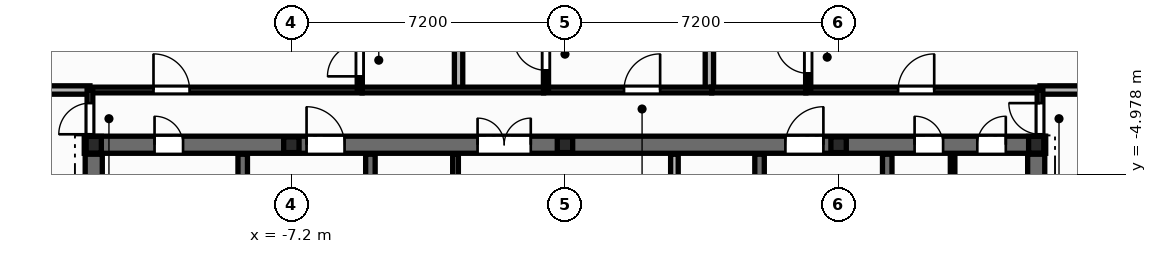
"""IFC4 building model, lengths in metres.
Left out: names, types, materials, properties, quantities, classifications, styles, units other than length and angle.
Written with IfcOpenShell. Run it as: python <this file> out.ifc"""

import sys

from ifc_helpers import new_model, si_unit, direction, frame, frame_2d, origin, origin_2d, place, context, subcontext, project, spatial, rectangle, i_section, extrude, element, fill, save


model = new_model("IFC4")
c1 = context("Model", 3, precision=1e-05, world=origin(), true_north=direction((0.0, 1.0)))
c2 = subcontext(c1, "Body", "Model", "MODEL_VIEW")
j1 = project(units=[si_unit("LENGTHUNIT", "METRE"), si_unit("PLANEANGLEUNIT", "RADIAN")], contexts=[c1])
p1 = place(None, origin())
s1 = spatial("IfcSite", under=j1, at=p1, CompositionType="ELEMENT")
p2 = place(p1, origin())
s2 = spatial("IfcBuilding", under=s1, at=p2, CompositionType="ELEMENT")
p3 = place(p2, frame((0.0, 0.0, 221.7)))
s3 = spatial("IfcBuildingStorey", under=s2, at=p3, CompositionType="ELEMENT", Elevation=221.7)
for number, where, z_axis, x_axis in (
    (1, (12.4, -4.2, 0.0), (0.0, 0.0, 1.0), (1.0, 0.0, 0.0)),
    (2, (-12.4, -4.2, 0.0), (0.0, 0.0, 1.0), (1.0, 0.0, 0.0)),
):
    element("IfcColumn", number, at=place(p3, frame(where, z_axis=z_axis, x_axis=x_axis)), inside=s3, PredefinedType="COLUMN", context=c2, shape_type="SweptSolid", body=[
        extrude(i_section(OverallWidth=0.4, OverallDepth=0.44, WebThickness=0.028, FlangeThickness=0.04, at=origin_2d()), origin(), (0.0, 0.0, 1.0), 3.6),
    ])
for number, where, z_axis, x_axis in (
    (3, (-7.2, -4.2, 0.0), (0.0, 0.0, 1.0), (1.0, 0.0, 0.0)),
    (4, (0.0, -4.2, 0.0), (0.0, 0.0, 1.0), (1.0, 0.0, 0.0)),
    (5, (7.2, -4.2, 0.0), (0.0, 0.0, 1.0), (1.0, 0.0, 0.0)),
):
    element("IfcColumn", number, at=place(p3, frame(where, z_axis=z_axis, x_axis=x_axis)), inside=s3, PredefinedType="PILASTER", context=c2, shape_type="SweptSolid", body=[
        extrude(i_section(OverallWidth=0.405, OverallDepth=0.414, WebThickness=0.022, FlangeThickness=0.032, at=origin_2d()), origin(), (0.0, 0.0, 1.0), 3.6),
    ])
p4 = place(p3, frame((-2.88, -5.6, 0.0), z_axis=(0.0, 0.0, 1.0), x_axis=(0.0, 1.0, 0.0)))
e6 = element("IfcWall", 6, at=p4, inside=s3, PredefinedType="PARTITIONING", context=c2, shape_type="SweptSolid", body=[
    extrude(rectangle(XDim=1.15, YDim=0.15, at=frame_2d((0.575, 0.0))), origin(), (0.0, 0.0, 1.0), 3.345),
])
p5 = place(p3, frame((10.2, -5.52, 0.0), z_axis=(0.0, 0.0, 1.0), x_axis=(0.0, 1.0, 0.0)))
e7 = element("IfcWall", 7, at=p5, inside=s3, PredefinedType="PARTITIONING", context=c2, shape_type="SweptSolid", body=[
    extrude(rectangle(XDim=1.12, YDim=0.12, at=frame_2d((0.56, 0.0))), origin(), (0.0, 0.0, 1.0), 3.345),
])
p6 = place(p3, frame((-12.65, -4.2, 0.0), z_axis=(0.0, 0.0, 1.0), x_axis=(1.0, 0.0, 0.0)))
e8 = element("IfcWall", 8, at=p6, inside=s3, PredefinedType="SHEAR", context=c2, shape_type="SweptSolid", body=[
    extrude(rectangle(XDim=25.3, YDim=0.45, at=frame_2d((12.65, 0.0))), origin(), (0.0, 0.0, 1.0), 3.6),
])
p7 = place(p6, frame((1.85, 0.0, 0.0)))
e9 = element("IfcOpeningElement", 9, at=p7, cuts=e8, PredefinedType="OPENING", context=c2, shape_type="SweptSolid", body=[
    extrude(rectangle(XDim=0.756, YDim=2.054, at=frame_2d((0.375, 1.027))), frame((0.0, 0.235, 0.0), z_axis=(0.0, -1.0, 0.0), x_axis=(1.0, 0.0, 0.0)), (0.0, 0.0, 1.0), 0.47),
])
p8 = place(p6, frame((21.85, 0.0, 0.0)))
e10 = element("IfcOpeningElement", 10, at=p8, cuts=e8, PredefinedType="OPENING", context=c2, shape_type="SweptSolid", body=[
    extrude(rectangle(XDim=0.756, YDim=2.054, at=frame_2d((0.375, 1.027))), frame((0.0, 0.235, 0.0), z_axis=(0.0, -1.0, 0.0), x_axis=(1.0, 0.0, 0.0)), (0.0, 0.0, 1.0), 0.47),
])
p9 = place(p6, frame((23.5, 0.0, 0.0)))
e11 = element("IfcOpeningElement", 11, at=p9, cuts=e8, PredefinedType="OPENING", context=c2, shape_type="SweptSolid", body=[
    extrude(rectangle(XDim=0.756, YDim=2.054, at=frame_2d((0.375, 1.027))), frame((0.0, 0.235, 0.0), z_axis=(0.0, -1.0, 0.0), x_axis=(1.0, 0.0, 0.0)), (0.0, 0.0, 1.0), 0.47),
])
p10 = place(p6, frame((5.85, 0.0, 0.0)))
e12 = element("IfcOpeningElement", 12, at=p10, cuts=e8, PredefinedType="OPENING", context=c2, shape_type="SweptSolid", body=[
    extrude(rectangle(XDim=1.006, YDim=2.104, at=frame_2d((0.5, 1.052))), frame((0.0, 0.235, 0.0), z_axis=(0.0, -1.0, 0.0), x_axis=(1.0, 0.0, 0.0)), (0.0, 0.0, 1.0), 0.47),
])
p11 = place(p6, frame((10.35, 0.0, 0.0)))
e13 = element("IfcOpeningElement", 13, at=p11, cuts=e8, PredefinedType="OPENING", context=c2, shape_type="SweptSolid", body=[
    extrude(rectangle(XDim=1.406, YDim=2.154, at=frame_2d((0.7, 1.077))), frame((0.0, 0.235, 0.0), z_axis=(0.0, -1.0, 0.0), x_axis=(1.0, 0.0, 0.0)), (0.0, 0.0, 1.0), 0.47),
])
p12 = place(p6, frame((18.45, 0.0, 0.0)))
e14 = element("IfcOpeningElement", 14, at=p12, cuts=e8, PredefinedType="OPENING", context=c2, shape_type="SweptSolid", body=[
    extrude(rectangle(XDim=1.006, YDim=2.104, at=frame_2d((0.5, 1.052))), frame((0.0, 0.235, 0.0), z_axis=(0.0, -1.0, 0.0), x_axis=(1.0, 0.0, 0.0)), (0.0, 0.0, 1.0), 0.47),
])
p13 = place(p3, frame((-8.48, -13.85, 0.0), z_axis=(0.0, 0.0, 1.0), x_axis=(0.0, 1.0, 0.0)))
e15 = element("IfcWall", 15, at=p13, inside=s3, PredefinedType="SHEAR", context=c2, shape_type="SweptSolid", body=[
    extrude(rectangle(XDim=9.4, YDim=0.25, at=frame_2d((4.7, 0.0))), origin(), (0.0, 0.0, 1.0), 3.6),
])
p14 = place(p13, frame((6.95, 0.0, 0.0)))
e16 = element("IfcOpeningElement", 16, at=p14, cuts=e15, PredefinedType="OPENING", context=c2, shape_type="SweptSolid", body=[
    extrude(rectangle(XDim=1.006, YDim=2.104, at=frame_2d((0.5, 1.052))), frame((0.0, 0.135, 0.0), z_axis=(0.0, -1.0, 0.0), x_axis=(1.0, 0.0, 0.0)), (0.0, 0.0, 1.0), 0.27),
])
p15 = place(p3, frame((8.48, -13.85, 0.0), z_axis=(0.0, 0.0, 1.0), x_axis=(0.0, 1.0, 0.0)))
e17 = element("IfcWall", 17, at=p15, inside=s3, PredefinedType="SHEAR", context=c2, shape_type="SweptSolid", body=[
    extrude(rectangle(XDim=9.4, YDim=0.25, at=frame_2d((4.7, 0.0))), origin(), (0.0, 0.0, 1.0), 3.6),
])
p16 = place(p15, frame((6.95, 0.0, 0.0)))
e18 = element("IfcOpeningElement", 18, at=p16, cuts=e17, PredefinedType="OPENING", context=c2, shape_type="SweptSolid", body=[
    extrude(rectangle(XDim=1.006, YDim=2.104, at=frame_2d((0.5, 1.052))), frame((0.0, 0.135, 0.0), z_axis=(0.0, -1.0, 0.0), x_axis=(1.0, 0.0, 0.0)), (0.0, 0.0, 1.0), 0.27),
])
for number, where, z_axis, x_axis in (
    (19, (-5.12, -13.85, 0.0), (0.0, 0.0, 1.0), (0.0, 1.0, 0.0)),
    (20, (5.12, -13.85, 0.0), (0.0, 0.0, 1.0), (0.0, 1.0, 0.0)),
):
    element("IfcWall", number, at=place(p3, frame(where, z_axis=z_axis, x_axis=x_axis)), inside=s3, PredefinedType="SHEAR", context=c2, shape_type="SweptSolid", body=[
        extrude(rectangle(XDim=9.4, YDim=0.25, at=frame_2d((4.7, 0.0))), origin(), (0.0, 0.0, 1.0), 3.6),
    ])
for number, where, z_axis, x_axis in (
    (21, (-12.4, -13.85, 0.0), (0.0, 0.0, 1.0), (0.0, 1.0, 0.0)),
    (22, (12.4, -13.85, 0.0), (0.0, 0.0, 1.0), (0.0, 1.0, 0.0)),
):
    element("IfcWall", number, at=place(p3, frame(where, z_axis=z_axis, x_axis=x_axis)), inside=s3, PredefinedType="SHEAR", context=c2, shape_type="SweptSolid", body=[
        extrude(rectangle(XDim=9.4, YDim=0.45, at=frame_2d((4.7, 0.0))), origin(), (0.0, 0.0, 1.0), 3.6),
    ])
p17 = place(p3, frame((2.88, -9.45, 0.0), z_axis=(0.0, 0.0, 1.0), x_axis=(0.0, 1.0, 0.0)))
e23 = element("IfcWall", 23, at=p17, inside=s3, PredefinedType="SOLIDWALL", context=c2, shape_type="SweptSolid", body=[
    extrude(rectangle(XDim=5.0, YDim=0.2, at=frame_2d((2.5, 0.0))), origin(), (0.0, 0.0, 1.0), 3.345),
])
p18 = place(p17, frame((2.05, 0.0, 0.0)))
e24 = element("IfcOpeningElement", 24, at=p18, cuts=e23, PredefinedType="OPENING", context=c2, shape_type="SweptSolid", body=[
    extrude(rectangle(XDim=0.926, YDim=2.104, at=frame_2d((0.46, 1.052))), frame((0.0, 0.11, 0.0), z_axis=(0.0, -1.0, 0.0), x_axis=(1.0, 0.0, 0.0)), (0.0, 0.0, 1.0), 0.22),
])
p19 = place(p3, frame((-12.5, -2.76, 0.0), z_axis=(0.0, 0.0, 1.0), x_axis=(1.0, 0.0, 0.0)))
e25 = element("IfcWall", 25, at=p19, inside=s3, PredefinedType="PARTITIONING", context=c2, shape_type="SweptSolid", body=[
    extrude(rectangle(XDim=7.16, YDim=0.15, at=frame_2d((3.58, 0.0))), origin(), (0.0, 0.0, 1.0), 2.32),
])
p20 = place(p19, frame((1.672, 0.0, 0.0)))
e26 = element("IfcOpeningElement", 26, at=p20, cuts=e25, PredefinedType="OPENING", context=c2, shape_type="SweptSolid", body=[
    extrude(rectangle(XDim=0.956, YDim=2.104, at=frame_2d((0.475, 1.052))), frame((0.0, 0.085, 0.0), z_axis=(0.0, -1.0, 0.0), x_axis=(1.0, 0.0, 0.0)), (0.0, 0.0, 1.0), 0.17),
])
p21 = place(p3, frame((6.34, -2.76, 0.0), z_axis=(0.0, 0.0, 1.0), x_axis=(1.0, 0.0, 0.0)))
e27 = element("IfcWall", 27, at=p21, inside=s3, PredefinedType="PARTITIONING", context=c2, shape_type="SweptSolid", body=[
    extrude(rectangle(XDim=6.16, YDim=0.15, at=frame_2d((3.08, 0.0))), origin(), (0.0, 0.0, 1.0), 2.32),
])
p22 = place(p21, frame((2.426, 0.0, 0.0)))
e28 = element("IfcOpeningElement", 28, at=p22, cuts=e27, PredefinedType="OPENING", context=c2, shape_type="SweptSolid", body=[
    extrude(rectangle(XDim=0.956, YDim=2.104, at=frame_2d((0.475, 1.052))), frame((0.0, 0.085, 0.0), z_axis=(0.0, -1.0, 0.0), x_axis=(1.0, 0.0, 0.0)), (0.0, 0.0, 1.0), 0.17),
])
p23 = place(p3, frame((3.8, -2.76, 0.0), z_axis=(0.0, 0.0, 1.0), x_axis=(0.0, 1.0, 0.0)))
e29 = element("IfcWall", 29, at=p23, inside=s3, PredefinedType="PARTITIONING", context=c2, shape_type="SweptSolid", body=[
    extrude(rectangle(XDim=15.266, YDim=0.22, at=frame_2d((7.633, 0.0))), origin(), (0.0, 0.0, 1.0), 2.32),
])
p24 = place(p3, frame((-2.8, -2.76, 0.0), z_axis=(0.0, 0.0, 1.0), x_axis=(0.0, 1.0, 0.0)))
e30 = element("IfcWall", 30, at=p24, inside=s3, PredefinedType="PARTITIONING", context=c2, shape_type="SweptSolid", body=[
    extrude(rectangle(XDim=11.04, YDim=0.22, at=frame_2d((5.52, 0.0))), origin(), (0.0, 0.0, 1.0), 2.32),
])
p25 = place(p3, frame((-0.56, -2.76, 0.0), z_axis=(0.0, 0.0, 1.0), x_axis=(1.0, 0.0, 0.0)))
e31 = element("IfcWall", 31, at=p25, inside=s3, PredefinedType="PARTITIONING", context=c2, shape_type="SweptSolid", body=[
    extrude(rectangle(XDim=4.42, YDim=0.15, at=frame_2d((2.21, 0.0))), origin(), (0.0, 0.0, 1.0), 2.32),
])
p26 = place(p25, frame((2.114, 0.0, 0.0)))
e32 = element("IfcOpeningElement", 32, at=p26, cuts=e31, PredefinedType="OPENING", context=c2, shape_type="SweptSolid", body=[
    extrude(rectangle(XDim=0.956, YDim=2.104, at=frame_2d((0.475, 1.052))), frame((0.0, 0.085, 0.0), z_axis=(0.0, -1.0, 0.0), x_axis=(1.0, 0.0, 0.0)), (0.0, 0.0, 1.0), 0.17),
])
p27 = place(p3, frame((-5.4, -2.76, 0.0), z_axis=(0.0, 0.0, 1.0), x_axis=(0.0, 1.0, 0.0)))
e33 = element("IfcWall", 33, at=p27, inside=s3, PredefinedType="PARTITIONING", context=c2, shape_type="SweptSolid", body=[
    extrude(rectangle(XDim=2.92, YDim=0.135, at=frame_2d((1.46, 0.0))), origin(), (0.0, 0.0, 1.0), 3.345),
])
p28 = place(p27, frame((0.359, 0.0, 0.0)))
e34 = element("IfcOpeningElement", 34, at=p28, cuts=e33, PredefinedType="OPENING", context=c2, shape_type="SweptSolid", body=[
    extrude(rectangle(XDim=0.856, YDim=2.104, at=frame_2d((0.425, 1.052))), frame((0.0, 0.078, 0.0), z_axis=(0.0, -1.0, 0.0), x_axis=(1.0, 0.0, 0.0)), (0.0, 0.0, 1.0), 0.155),
])
p29 = place(p3, frame((-0.5, -2.76, 0.0), z_axis=(0.0, 0.0, 1.0), x_axis=(0.0, 1.0, 0.0)))
e35 = element("IfcWall", 35, at=p29, inside=s3, PredefinedType="PARTITIONING", context=c2, shape_type="SweptSolid", body=[
    extrude(rectangle(XDim=2.92, YDim=0.135, at=frame_2d((1.46, 0.0))), origin(), (0.0, 0.0, 1.0), 3.345),
])
p30 = place(p29, frame((0.518, 0.0, 0.0)))
e36 = element("IfcOpeningElement", 36, at=p30, cuts=e35, PredefinedType="OPENING", context=c2, shape_type="SweptSolid", body=[
    extrude(rectangle(XDim=0.856, YDim=2.104, at=frame_2d((0.425, 1.052))), frame((0.0, 0.078, 0.0), z_axis=(0.0, -1.0, 0.0), x_axis=(1.0, 0.0, 0.0)), (0.0, 0.0, 1.0), 0.155),
])
p31 = place(p3, frame((6.4, -2.76, 0.0), z_axis=(0.0, 0.0, 1.0), x_axis=(0.0, 1.0, 0.0)))
e37 = element("IfcWall", 37, at=p31, inside=s3, PredefinedType="PARTITIONING", context=c2, shape_type="SweptSolid", body=[
    extrude(rectangle(XDim=2.92, YDim=0.135, at=frame_2d((1.46, 0.0))), origin(), (0.0, 0.0, 1.0), 3.345),
])
p32 = place(p31, frame((0.438, 0.0, 0.0)))
e38 = element("IfcOpeningElement", 38, at=p32, cuts=e37, PredefinedType="OPENING", context=c2, shape_type="SweptSolid", body=[
    extrude(rectangle(XDim=0.856, YDim=2.104, at=frame_2d((0.425, 1.052))), frame((0.0, 0.078, 0.0), z_axis=(0.0, -1.0, 0.0), x_axis=(1.0, 0.0, 0.0)), (0.0, 0.0, 1.0), 0.155),
])
p33 = place(p3, frame((-5.338, -2.76, 0.0), z_axis=(0.0, 0.0, 1.0), x_axis=(1.0, 0.0, 0.0)))
e39 = element("IfcWall", 39, at=p33, inside=s3, PredefinedType="PARTITIONING", context=c2, shape_type="SweptSolid", body=[
    extrude(rectangle(XDim=4.776, YDim=0.15, at=frame_2d((2.388, 0.0))), origin(), (0.0, 0.0, 1.0), 2.964),
])
p34 = place(p3, frame((3.862, -2.76, 0.0), z_axis=(0.0, 0.0, 1.0), x_axis=(1.0, 0.0, 0.0)))
e40 = element("IfcWall", 40, at=p34, inside=s3, PredefinedType="PARTITIONING", context=c2, shape_type="SweptSolid", body=[
    extrude(rectangle(XDim=2.476, YDim=0.15, at=frame_2d((1.238, 0.0))), origin(), (0.0, 0.0, 1.0), 3.345),
])
for number, where, z_axis, x_axis in (
    (41, (-14.757, -2.76, 0.0), (0.0, 0.0, 1.0), (1.0, 0.0, 0.0)),
    (42, (12.5, -2.76, 0.0), (0.0, 0.0, 1.0), (1.0, 0.0, 0.0)),
):
    element("IfcWall", number, at=place(p3, frame(where, z_axis=z_axis, x_axis=x_axis)), inside=s3, PredefinedType="PARTITIONING", context=c2, shape_type="SweptSolid", body=[
        extrude(rectangle(XDim=2.257, YDim=0.22, at=frame_2d((1.129, 0.0))), origin(), (0.0, 0.0, 1.0), 2.62),
    ])
p35 = place(p3, frame((-12.5, -4.24, 0.0), z_axis=(0.0, 0.0, 1.0), x_axis=(0.0, 1.0, 0.0)))
e43 = element("IfcWall", 43, at=p35, inside=s3, PredefinedType="PARTITIONING", context=c2, shape_type="SweptSolid", body=[
    extrude(rectangle(XDim=1.48, YDim=0.15, at=frame_2d((0.74, 0.0))), origin(), (0.0, 0.0, 1.0), 2.32),
])
p36 = place(p35, frame((0.315, 0.0, 0.0)))
e44 = element("IfcOpeningElement", 44, at=p36, cuts=e43, PredefinedType="OPENING", context=c2, shape_type="SweptSolid", body=[
    extrude(rectangle(XDim=0.826, YDim=2.104, at=frame_2d((0.41, 1.052))), frame((0.0, 0.085, 0.0), z_axis=(0.0, -1.0, 0.0), x_axis=(1.0, 0.0, 0.0)), (0.0, 0.0, 1.0), 0.17),
])
p37 = place(p3, frame((12.5, -4.24, 0.0), z_axis=(0.0, 0.0, 1.0), x_axis=(0.0, 1.0, 0.0)))
e45 = element("IfcWall", 45, at=p37, inside=s3, PredefinedType="PARTITIONING", context=c2, shape_type="SweptSolid", body=[
    extrude(rectangle(XDim=1.48, YDim=0.15, at=frame_2d((0.74, 0.0))), origin(), (0.0, 0.0, 1.0), 2.32),
])
p38 = place(p37, frame((0.315, 0.0, 0.0)))
e46 = element("IfcOpeningElement", 46, at=p38, cuts=e45, PredefinedType="OPENING", context=c2, shape_type="SweptSolid", body=[
    extrude(rectangle(XDim=0.826, YDim=2.104, at=frame_2d((0.41, 1.052))), frame((0.0, 0.085, 0.0), z_axis=(0.0, -1.0, 0.0), x_axis=(1.0, 0.0, 0.0)), (0.0, 0.0, 1.0), 0.17),
])
p39 = place(p7, origin())
e47 = element("IfcDoor", 47, at=p39, inside=s3, OperationType="SINGLE_SWING_LEFT", PredefinedType="DOOR", context=c2, shape_type="SweptSolid", body=[
    extrude(rectangle(XDim=0.75, YDim=2.05, at=frame_2d((0.375, 1.025))), frame((0.0, 0.025, 0.0), z_axis=(0.0, -1.0, 0.0), x_axis=(1.0, 0.0, 0.0)), (0.0, 0.0, 1.0), 0.05),
])
fill(e9, e47)
p40 = place(p8, origin())
e48 = element("IfcDoor", 48, at=p40, inside=s3, OperationType="SINGLE_SWING_LEFT", PredefinedType="DOOR", context=c2, shape_type="SweptSolid", body=[
    extrude(rectangle(XDim=0.75, YDim=2.05, at=frame_2d((0.375, 1.025))), frame((0.0, 0.025, 0.0), z_axis=(0.0, -1.0, 0.0), x_axis=(1.0, 0.0, 0.0)), (0.0, 0.0, 1.0), 0.05),
])
fill(e10, e48)
p41 = place(p9, origin())
e49 = element("IfcDoor", 49, at=p41, inside=s3, OperationType="SINGLE_SWING_RIGHT", PredefinedType="DOOR", context=c2, shape_type="SweptSolid", body=[
    extrude(rectangle(XDim=0.75, YDim=2.05, at=frame_2d((0.375, 1.025))), frame((0.0, 0.025, 0.0), z_axis=(0.0, -1.0, 0.0), x_axis=(1.0, 0.0, 0.0)), (0.0, 0.0, 1.0), 0.05),
])
fill(e11, e49)
p42 = place(p10, origin())
e50 = element("IfcDoor", 50, at=p42, inside=s3, OperationType="SINGLE_SWING_LEFT", PredefinedType="DOOR", context=c2, shape_type="SweptSolid", body=[
    extrude(rectangle(XDim=1.0, YDim=2.1, at=frame_2d((0.5, 1.05))), frame((0.0, 0.025, 0.0), z_axis=(0.0, -1.0, 0.0), x_axis=(1.0, 0.0, 0.0)), (0.0, 0.0, 1.0), 0.05),
])
fill(e12, e50)
p43 = place(p11, origin())
e51 = element("IfcDoor", 51, at=p43, inside=s3, OperationType="DOUBLE_DOOR_SINGLE_SWING", PredefinedType="DOOR", context=c2, shape_type="SweptSolid", body=[
    extrude(rectangle(XDim=1.4, YDim=2.15, at=frame_2d((0.7, 1.075))), frame((0.0, 0.025, 0.0), z_axis=(0.0, -1.0, 0.0), x_axis=(1.0, 0.0, 0.0)), (0.0, 0.0, 1.0), 0.05),
])
fill(e13, e51)
p44 = place(p12, origin())
e52 = element("IfcDoor", 52, at=p44, inside=s3, OperationType="SINGLE_SWING_RIGHT", PredefinedType="DOOR", context=c2, shape_type="SweptSolid", body=[
    extrude(rectangle(XDim=1.0, YDim=2.1, at=frame_2d((0.5, 1.05))), frame((0.0, 0.025, 0.0), z_axis=(0.0, -1.0, 0.0), x_axis=(1.0, 0.0, 0.0)), (0.0, 0.0, 1.0), 0.05),
])
fill(e14, e52)
p45 = place(p36, origin())
e53 = element("IfcDoor", 53, at=p45, inside=s3, OperationType="SINGLE_SWING_LEFT", PredefinedType="DOOR", context=c2, shape_type="SweptSolid", body=[
    extrude(rectangle(XDim=0.82, YDim=2.1, at=frame_2d((0.41, 1.05))), frame((0.0, 0.025, 0.0), z_axis=(0.0, -1.0, 0.0), x_axis=(1.0, 0.0, 0.0)), (0.0, 0.0, 1.0), 0.05),
])
fill(e44, e53)
p46 = place(p38, origin())
e54 = element("IfcDoor", 54, at=p46, inside=s3, OperationType="SINGLE_SWING_RIGHT", PredefinedType="DOOR", context=c2, shape_type="SweptSolid", body=[
    extrude(rectangle(XDim=0.82, YDim=2.1, at=frame_2d((0.41, 1.05))), frame((0.0, 0.025, 0.0), z_axis=(0.0, -1.0, 0.0), x_axis=(1.0, 0.0, 0.0)), (0.0, 0.0, 1.0), 0.05),
])
fill(e46, e54)
p47 = place(p28, origin())
e55 = element("IfcDoor", 55, at=p47, inside=s3, OperationType="SINGLE_SWING_LEFT", PredefinedType="DOOR", context=c2, shape_type="SweptSolid", body=[
    extrude(rectangle(XDim=0.85, YDim=2.1, at=frame_2d((0.425, 1.05))), frame((0.0, 0.025, 0.0), z_axis=(0.0, -1.0, 0.0), x_axis=(1.0, 0.0, 0.0)), (0.0, 0.0, 1.0), 0.05),
])
fill(e34, e55)
p48 = place(p20, origin())
e56 = element("IfcDoor", 56, at=p48, inside=s3, OperationType="SINGLE_SWING_LEFT", PredefinedType="DOOR", context=c2, shape_type="SweptSolid", body=[
    extrude(rectangle(XDim=0.95, YDim=2.1, at=frame_2d((0.475, 1.05))), frame((0.0, 0.025, 0.0), z_axis=(0.0, -1.0, 0.0), x_axis=(1.0, 0.0, 0.0)), (0.0, 0.0, 1.0), 0.05),
])
fill(e26, e56)
p49 = place(p30, origin())
e57 = element("IfcDoor", 57, at=p49, inside=s3, OperationType="SINGLE_SWING_RIGHT", PredefinedType="DOOR", context=c2, shape_type="SweptSolid", body=[
    extrude(rectangle(XDim=0.85, YDim=2.1, at=frame_2d((0.425, 1.05))), frame((0.0, 0.025, 0.0), z_axis=(0.0, -1.0, 0.0), x_axis=(1.0, 0.0, 0.0)), (0.0, 0.0, 1.0), 0.05),
])
fill(e36, e57)
p50 = place(p26, origin())
e58 = element("IfcDoor", 58, at=p50, inside=s3, OperationType="SINGLE_SWING_RIGHT", PredefinedType="DOOR", context=c2, shape_type="SweptSolid", body=[
    extrude(rectangle(XDim=0.95, YDim=2.1, at=frame_2d((0.475, 1.05))), frame((0.0, 0.025, 0.0), z_axis=(0.0, -1.0, 0.0), x_axis=(1.0, 0.0, 0.0)), (0.0, 0.0, 1.0), 0.05),
])
fill(e32, e58)
p51 = place(p32, origin())
e59 = element("IfcDoor", 59, at=p51, inside=s3, OperationType="SINGLE_SWING_RIGHT", PredefinedType="DOOR", context=c2, shape_type="SweptSolid", body=[
    extrude(rectangle(XDim=0.85, YDim=2.1, at=frame_2d((0.425, 1.05))), frame((0.0, 0.025, 0.0), z_axis=(0.0, -1.0, 0.0), x_axis=(1.0, 0.0, 0.0)), (0.0, 0.0, 1.0), 0.05),
])
fill(e38, e59)
p52 = place(p22, origin())
e60 = element("IfcDoor", 60, at=p52, inside=s3, OperationType="SINGLE_SWING_RIGHT", PredefinedType="DOOR", context=c2, shape_type="SweptSolid", body=[
    extrude(rectangle(XDim=0.95, YDim=2.1, at=frame_2d((0.475, 1.05))), frame((0.0, 0.025, 0.0), z_axis=(0.0, -1.0, 0.0), x_axis=(1.0, 0.0, 0.0)), (0.0, 0.0, 1.0), 0.05),
])
fill(e28, e60)
save(model, sys.argv[1])
